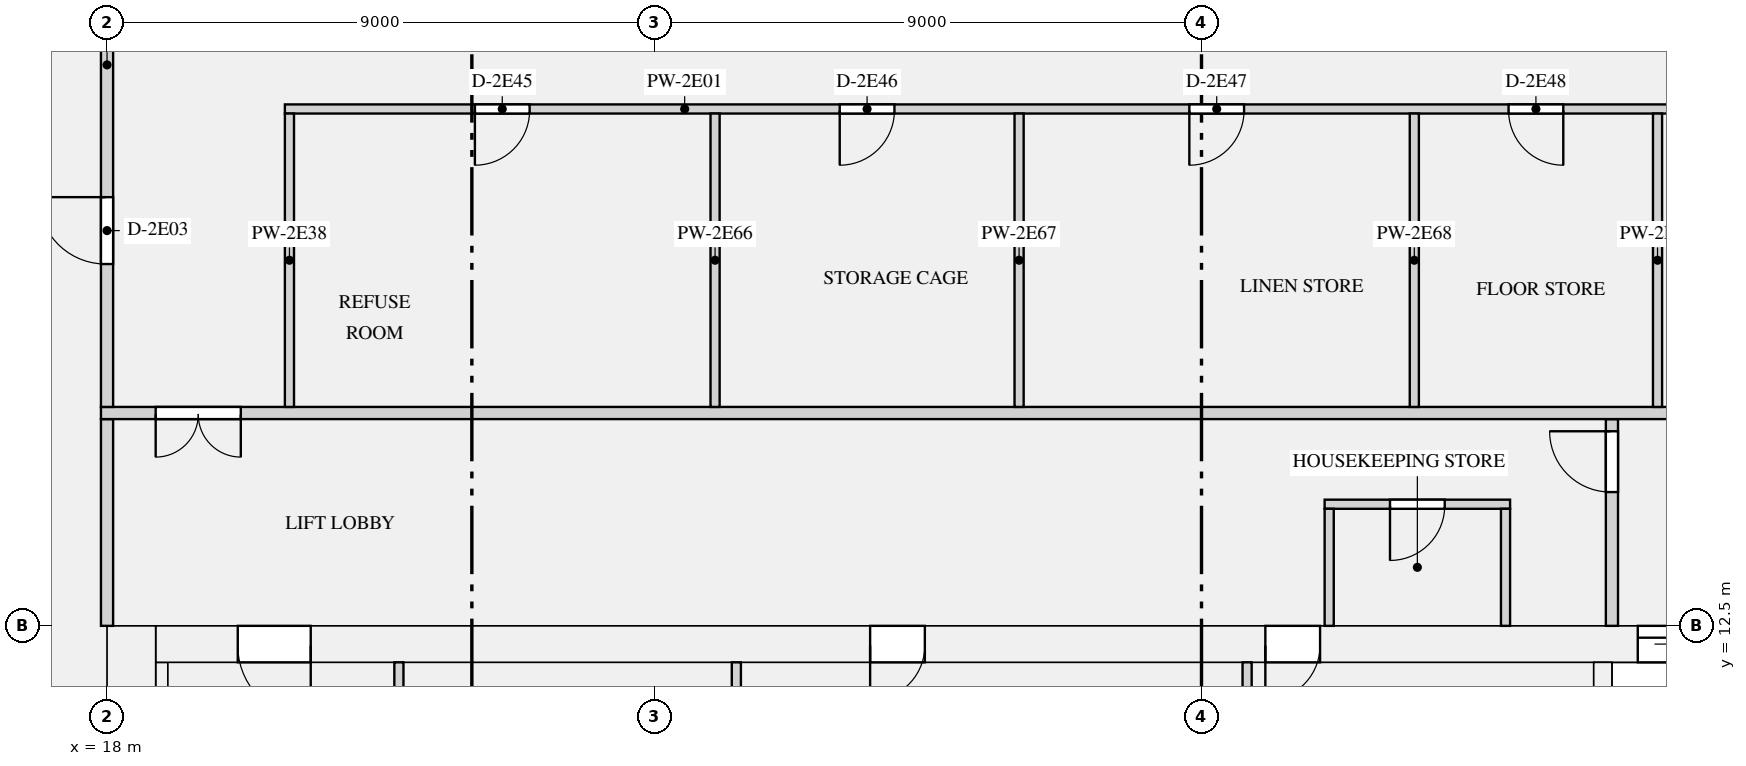
"""IFC4 building model, lengths in metres.
Left out: names, types, materials, properties, quantities, classifications, styles, units other than length and angle.
Written with IfcOpenShell. Run it as: python <this file> out.ifc"""

import sys

from ifc_helpers import new_model, si_unit, direction, frame, frame_2d, origin, place, context, subcontext, project, spatial, rectangle, extrude, element, fill, save


model = new_model("IFC4")
c1 = context("Model", 3, precision=1e-05, world=origin(), true_north=direction((0.0, 1.0)))
c2 = subcontext(c1, "Body", "Model", "MODEL_VIEW")
j1 = project(units=[si_unit("LENGTHUNIT", "METRE"), si_unit("PLANEANGLEUNIT", "RADIAN")], contexts=[c1])
p1 = place(None, origin())
s1 = spatial("IfcSite", under=j1, at=p1, CompositionType="ELEMENT")
p2 = place(p1, origin())
s2 = spatial("IfcBuilding", under=s1, at=p2, CompositionType="ELEMENT")
p3 = place(p2, frame((0.0, 0.0, 118.2)))
s3 = spatial("IfcBuildingStorey", under=s2, at=p3, CompositionType="ELEMENT", Elevation=118.2)
p4 = place(p3, frame((18.4, 0.0, 0.0), z_axis=(0.0, 0.0, 1.0), x_axis=(0.0, 1.0, 0.0)))
e1 = element("IfcWall", 1, at=p4, inside=s3, PredefinedType="SHEAR", context=c2, shape_type="SweptSolid", body=[
    extrude(rectangle(XDim=12.5, YDim=0.8, at=frame_2d((6.25, 0.0))), origin(), (0.0, 0.0, 1.0), 3.15),
])
p5 = place(p3, frame((18.8, 12.2, 0.0), z_axis=(0.0, 0.0, 1.0), x_axis=(1.0, 0.0, 0.0)))
e2 = element("IfcWall", 2, at=p5, inside=s3, PredefinedType="SHEAR", context=c2, shape_type="SweptSolid", body=[
    extrude(rectangle(XDim=34.4, YDim=0.6, at=frame_2d((17.2, 0.0))), origin(), (0.0, 0.0, 1.0), 3.15),
])
p6 = place(p5, frame((24.375, 0.0, 0.0)))
e3 = element("IfcOpeningElement", 3, at=p6, cuts=e2, PredefinedType="OPENING", context=c2, shape_type="SweptSolid", body=[
    extrude(rectangle(XDim=1.1, YDim=2.1, at=frame_2d((0.55, 1.05))), frame((0.0, 0.31, 0.0), z_axis=(0.0, -1.0, 0.0), x_axis=(1.0, 0.0, 0.0)), (0.0, 0.0, 1.0), 0.62),
])
p7 = place(p5, frame((26.625, 0.0, 0.0)))
e4 = element("IfcOpeningElement", 4, at=p7, cuts=e2, PredefinedType="OPENING", context=c2, shape_type="SweptSolid", body=[
    extrude(rectangle(XDim=1.1, YDim=2.1, at=frame_2d((0.55, 1.05))), frame((0.0, 0.31, 0.0), z_axis=(0.0, -1.0, 0.0), x_axis=(1.0, 0.0, 0.0)), (0.0, 0.0, 1.0), 0.62),
])
p8 = place(p5, frame((28.875, 0.0, 0.0)))
e5 = element("IfcOpeningElement", 5, at=p8, cuts=e2, PredefinedType="OPENING", context=c2, shape_type="SweptSolid", body=[
    extrude(rectangle(XDim=1.1, YDim=2.1, at=frame_2d((0.55, 1.05))), frame((0.0, 0.31, 0.0), z_axis=(0.0, -1.0, 0.0), x_axis=(1.0, 0.0, 0.0)), (0.0, 0.0, 1.0), 0.62),
])
p9 = place(p5, frame((11.75, 0.0, 0.0)))
e6 = element("IfcOpeningElement", 6, at=p9, cuts=e2, PredefinedType="OPENING", context=c2, shape_type="SweptSolid", body=[
    extrude(rectangle(XDim=0.9, YDim=2.1, at=frame_2d((0.45, 1.05))), frame((0.0, 0.31, 0.0), z_axis=(0.0, -1.0, 0.0), x_axis=(1.0, 0.0, 0.0)), (0.0, 0.0, 1.0), 0.62),
])
p10 = place(p5, frame((18.25, 0.0, 0.0)))
e7 = element("IfcOpeningElement", 7, at=p10, cuts=e2, PredefinedType="OPENING", context=c2, shape_type="SweptSolid", body=[
    extrude(rectangle(XDim=0.9, YDim=2.1, at=frame_2d((0.45, 1.05))), frame((0.0, 0.31, 0.0), z_axis=(0.0, -1.0, 0.0), x_axis=(1.0, 0.0, 0.0)), (0.0, 0.0, 1.0), 0.62),
])
p11 = place(p5, frame((1.35, 0.0, 0.0)))
e8 = element("IfcOpeningElement", 8, at=p11, cuts=e2, PredefinedType="OPENING", context=c2, shape_type="SweptSolid", body=[
    extrude(rectangle(XDim=1.2, YDim=2.1, at=frame_2d((0.6, 1.05))), frame((0.0, 0.31, 0.0), z_axis=(0.0, -1.0, 0.0), x_axis=(1.0, 0.0, 0.0)), (0.0, 0.0, 1.0), 0.62),
])
p12 = place(p5, frame((31.85, 0.0, 0.0)))
e9 = element("IfcOpeningElement", 9, at=p12, cuts=e2, PredefinedType="OPENING", context=c2, shape_type="SweptSolid", body=[
    extrude(rectangle(XDim=1.2, YDim=2.1, at=frame_2d((0.6, 1.05))), frame((0.0, 0.31, 0.0), z_axis=(0.0, -1.0, 0.0), x_axis=(1.0, 0.0, 0.0)), (0.0, 0.0, 1.0), 0.62),
])
p13 = place(p3, frame((18.9, 1.0, 0.0), z_axis=(0.0, 0.0, 1.0), x_axis=(0.0, 1.0, 0.0)))
e10 = element("IfcWall", 10, at=p13, inside=s3, PredefinedType="SHEAR", context=c2, shape_type="SweptSolid", body=[
    extrude(rectangle(XDim=10.9, YDim=0.2, at=frame_2d((5.45, 0.0))), origin(), (0.0, 0.0, 1.0), 3.15),
])
p14 = place(p3, frame((42.6, 8.25, 0.0), z_axis=(0.0, 0.0, 1.0), x_axis=(0.0, 1.0, 0.0)))
e11 = element("IfcWall", 11, at=p14, inside=s3, PredefinedType="SHEAR", context=c2, shape_type="SweptSolid", body=[
    extrude(rectangle(XDim=3.65, YDim=0.3, at=frame_2d((1.825, 0.0))), origin(), (0.0, 0.0, 1.0), 3.15),
])
p15 = place(p3, frame((38.025, 14.5, 0.0), z_axis=(0.0, 0.0, 1.0), x_axis=(1.0, 0.0, 0.0)))
e12 = element("IfcWall", 12, at=p15, inside=s3, PredefinedType="PARTITIONING", context=c2, shape_type="SweptSolid", body=[
    extrude(rectangle(XDim=3.05, YDim=0.15, at=frame_2d((1.525, 0.0))), origin(), (0.0, 0.0, 1.0), 2.83),
])
p16 = place(p15, frame((1.075, 0.0, 0.0)))
e13 = element("IfcOpeningElement", 13, at=p16, cuts=e12, PredefinedType="OPENING", context=c2, shape_type="SweptSolid", body=[
    extrude(rectangle(XDim=0.9, YDim=2.1, at=frame_2d((0.45, 1.05))), frame((0.0, 0.085, 0.0), z_axis=(0.0, -1.0, 0.0), x_axis=(1.0, 0.0, 0.0)), (0.0, 0.0, 1.0), 0.17),
])
p17 = place(p3, frame((22.8, 6.725, 0.0), z_axis=(0.0, 0.0, 1.0), x_axis=(0.0, 1.0, 0.0)))
e14 = element("IfcWall", 14, at=p17, inside=s3, PredefinedType="PARTITIONING", context=c2, shape_type="SweptSolid", body=[
    extrude(rectangle(XDim=5.175, YDim=0.15, at=frame_2d((2.587, 0.0))), origin(), (0.0, 0.0, 1.0), 2.83),
])
for number, where, z_axis, x_axis in (
    (15, (28.35, 9.265, 0.0), (0.0, 0.0, 1.0), (0.0, 1.0, 0.0)),
    (16, (36.75, 9.265, 0.0), (0.0, 0.0, 1.0), (0.0, 1.0, 0.0)),
):
    element("IfcWall", number, at=place(p3, frame(where, z_axis=z_axis, x_axis=x_axis)), inside=s3, PredefinedType="PARTITIONING", context=c2, shape_type="SweptSolid", body=[
        extrude(rectangle(XDim=2.635, YDim=0.15, at=frame_2d((1.317, 0.0))), origin(), (0.0, 0.0, 1.0), 2.83),
    ])
p18 = place(p3, frame((18.0, 12.5, 0.0), z_axis=(0.0, 0.0, 1.0), x_axis=(0.0, 1.0, 0.0)))
e17 = element("IfcWall", 17, at=p18, inside=s3, PredefinedType="PARTITIONING", context=c2, shape_type="SweptSolid", body=[
    extrude(rectangle(XDim=3.4, YDim=0.2, at=frame_2d((1.7, 0.0))), origin(), (0.0, 0.0, 1.0), 2.83),
])
for number, where, z_axis, x_axis in (
    (18, (38.1, 12.5, 0.0), (0.0, 0.0, 1.0), (0.0, 1.0, 0.0)),
    (19, (41.0, 12.5, 0.0), (0.0, 0.0, 1.0), (0.0, 1.0, 0.0)),
):
    element("IfcWall", number, at=place(p3, frame(where, z_axis=z_axis, x_axis=x_axis)), inside=s3, PredefinedType="PARTITIONING", context=c2, shape_type="SweptSolid", body=[
        extrude(rectangle(XDim=1.925, YDim=0.15, at=frame_2d((0.962, 0.0))), origin(), (0.0, 0.0, 1.0), 2.83),
    ])
p19 = place(p3, frame((42.75, 12.5, 0.0), z_axis=(0.0, 0.0, 1.0), x_axis=(0.0, 1.0, 0.0)))
e20 = element("IfcWall", 20, at=p19, inside=s3, PredefinedType="PARTITIONING", context=c2, shape_type="SweptSolid", body=[
    extrude(rectangle(XDim=3.4, YDim=0.2, at=frame_2d((1.7, 0.0))), origin(), (0.0, 0.0, 1.0), 2.83),
])
p20 = place(p19, frame((2.2, 0.0, 0.0)))
e21 = element("IfcOpeningElement", 21, at=p20, cuts=e20, PredefinedType="OPENING", context=c2, shape_type="SweptSolid", body=[
    extrude(rectangle(XDim=1.0, YDim=2.1, at=frame_2d((0.5, 1.05))), frame((0.0, 0.11, 0.0), z_axis=(0.0, -1.0, 0.0), x_axis=(1.0, 0.0, 0.0)), (0.0, 0.0, 1.0), 0.22),
])
p21 = place(p3, frame((20.925, 21.0, 0.0), z_axis=(0.0, 0.0, 1.0), x_axis=(1.0, 0.0, 0.0)))
e22 = element("IfcWall", 22, at=p21, inside=s3, PredefinedType="PARTITIONING", context=c2, shape_type="SweptSolid", body=[
    extrude(rectangle(XDim=30.15, YDim=0.15, at=frame_2d((15.075, 0.0))), origin(), (0.0, 0.0, 1.0), 2.83),
])
p22 = place(p21, frame((3.125, 0.0, 0.0)))
e23 = element("IfcOpeningElement", 23, at=p22, cuts=e22, PredefinedType="OPENING", context=c2, shape_type="SweptSolid", body=[
    extrude(rectangle(XDim=0.9, YDim=2.1, at=frame_2d((0.45, 1.05))), frame((0.0, 0.085, 0.0), z_axis=(0.0, -1.0, 0.0), x_axis=(1.0, 0.0, 0.0)), (0.0, 0.0, 1.0), 0.17),
])
p23 = place(p21, frame((9.125, 0.0, 0.0)))
e24 = element("IfcOpeningElement", 24, at=p23, cuts=e22, PredefinedType="OPENING", context=c2, shape_type="SweptSolid", body=[
    extrude(rectangle(XDim=0.9, YDim=2.1, at=frame_2d((0.45, 1.05))), frame((0.0, 0.085, 0.0), z_axis=(0.0, -1.0, 0.0), x_axis=(1.0, 0.0, 0.0)), (0.0, 0.0, 1.0), 0.17),
])
p24 = place(p21, frame((14.875, 0.0, 0.0)))
e25 = element("IfcOpeningElement", 25, at=p24, cuts=e22, PredefinedType="OPENING", context=c2, shape_type="SweptSolid", body=[
    extrude(rectangle(XDim=0.9, YDim=2.1, at=frame_2d((0.45, 1.05))), frame((0.0, 0.085, 0.0), z_axis=(0.0, -1.0, 0.0), x_axis=(1.0, 0.0, 0.0)), (0.0, 0.0, 1.0), 0.17),
])
p25 = place(p21, frame((20.125, 0.0, 0.0)))
e26 = element("IfcOpeningElement", 26, at=p25, cuts=e22, PredefinedType="OPENING", context=c2, shape_type="SweptSolid", body=[
    extrude(rectangle(XDim=0.9, YDim=2.1, at=frame_2d((0.45, 1.05))), frame((0.0, 0.085, 0.0), z_axis=(0.0, -1.0, 0.0), x_axis=(1.0, 0.0, 0.0)), (0.0, 0.0, 1.0), 0.17),
])
p26 = place(p21, frame((25.875, 0.0, 0.0)))
e27 = element("IfcOpeningElement", 27, at=p26, cuts=e22, PredefinedType="OPENING", context=c2, shape_type="SweptSolid", body=[
    extrude(rectangle(XDim=0.9, YDim=2.1, at=frame_2d((0.45, 1.05))), frame((0.0, 0.085, 0.0), z_axis=(0.0, -1.0, 0.0), x_axis=(1.0, 0.0, 0.0)), (0.0, 0.0, 1.0), 0.17),
])
p27 = place(p3, frame((17.9, 16.0, 0.0), z_axis=(0.0, 0.0, 1.0), x_axis=(1.0, 0.0, 0.0)))
e28 = element("IfcWall", 28, at=p27, inside=s3, PredefinedType="PARTITIONING", context=c2, shape_type="SweptSolid", body=[
    extrude(rectangle(XDim=36.2, YDim=0.2, at=frame_2d((18.1, 0.0))), origin(), (0.0, 0.0, 1.0), 2.83),
])
p28 = place(p27, frame((0.9, 0.0, 0.0)))
e29 = element("IfcOpeningElement", 29, at=p28, cuts=e28, PredefinedType="OPENING", context=c2, shape_type="SweptSolid", body=[
    extrude(rectangle(XDim=1.4, YDim=2.1, at=frame_2d((0.7, 1.05))), frame((0.0, 0.11, 0.0), z_axis=(0.0, -1.0, 0.0), x_axis=(1.0, 0.0, 0.0)), (0.0, 0.0, 1.0), 0.22),
])
p29 = place(p27, frame((33.9, 0.0, 0.0)))
e30 = element("IfcOpeningElement", 30, at=p29, cuts=e28, PredefinedType="OPENING", context=c2, shape_type="SweptSolid", body=[
    extrude(rectangle(XDim=1.4, YDim=2.1, at=frame_2d((0.7, 1.05))), frame((0.0, 0.11, 0.0), z_axis=(0.0, -1.0, 0.0), x_axis=(1.0, 0.0, 0.0)), (0.0, 0.0, 1.0), 0.22),
])
p30 = place(p3, frame((18.0, 16.1, 0.0), z_axis=(0.0, 0.0, 1.0), x_axis=(0.0, 1.0, 0.0)))
e31 = element("IfcWall", 31, at=p30, inside=s3, PredefinedType="PARTITIONING", context=c2, shape_type="SweptSolid", body=[
    extrude(rectangle(XDim=7.8, YDim=0.2, at=frame_2d((3.9, 0.0))), origin(), (0.0, 0.0, 1.0), 2.83),
])
p31 = place(p30, frame((2.35, 0.0, 0.0)))
e32 = element("IfcOpeningElement", 32, at=p31, cuts=e31, PredefinedType="OPENING", context=c2, shape_type="SweptSolid", body=[
    extrude(rectangle(XDim=1.1, YDim=2.1, at=frame_2d((0.55, 1.05))), frame((0.0, 0.11, 0.0), z_axis=(0.0, -1.0, 0.0), x_axis=(1.0, 0.0, 0.0)), (0.0, 0.0, 1.0), 0.22),
])
for number, where, z_axis, x_axis in (
    (33, (21.0, 16.1, 0.0), (0.0, 0.0, 1.0), (0.0, 1.0, 0.0)),
    (34, (28.0, 16.1, 0.0), (0.0, 0.0, 1.0), (0.0, 1.0, 0.0)),
    (35, (33.0, 16.1, 0.0), (0.0, 0.0, 1.0), (0.0, 1.0, 0.0)),
    (36, (39.5, 16.1, 0.0), (0.0, 0.0, 1.0), (0.0, 1.0, 0.0)),
    (37, (43.5, 16.1, 0.0), (0.0, 0.0, 1.0), (0.0, 1.0, 0.0)),
):
    element("IfcWall", number, at=place(p3, frame(where, z_axis=z_axis, x_axis=x_axis)), inside=s3, PredefinedType="PARTITIONING", context=c2, shape_type="SweptSolid", body=[
        extrude(rectangle(XDim=4.825, YDim=0.15, at=frame_2d((2.413, 0.0))), origin(), (0.0, 0.0, 1.0), 2.83),
    ])
p32 = place(p6, origin())
e38 = element("IfcDoor", 38, at=p32, inside=s3, OperationType="DOUBLE_DOOR_SLIDING", PredefinedType="DOOR", context=c2, shape_type="SweptSolid", body=[
    extrude(rectangle(XDim=1.1, YDim=2.1, at=frame_2d((0.55, 1.05))), frame((0.0, 0.025, 0.0), z_axis=(0.0, -1.0, 0.0), x_axis=(1.0, 0.0, 0.0)), (0.0, 0.0, 1.0), 0.05),
])
fill(e3, e38)
p33 = place(p16, frame((0.9, 0.0, 0.0), z_axis=(0.0, 0.0, 1.0), x_axis=(-1.0, 0.0, 0.0)))
e39 = element("IfcDoor", 39, at=p33, inside=s3, OperationType="SINGLE_SWING_RIGHT", PredefinedType="DOOR", context=c2, shape_type="SweptSolid", body=[
    extrude(rectangle(XDim=0.9, YDim=2.1, at=frame_2d((0.45, 1.05))), frame((0.0, 0.025, 0.0), z_axis=(0.0, -1.0, 0.0), x_axis=(1.0, 0.0, 0.0)), (0.0, 0.0, 1.0), 0.05),
])
fill(e13, e39)
p34 = place(p9, frame((0.9, 0.0, 0.0), z_axis=(0.0, 0.0, 1.0), x_axis=(-1.0, 0.0, 0.0)))
e40 = element("IfcDoor", 40, at=p34, inside=s3, OperationType="SINGLE_SWING_RIGHT", PredefinedType="DOOR", context=c2, shape_type="SweptSolid", body=[
    extrude(rectangle(XDim=0.9, YDim=2.1, at=frame_2d((0.45, 1.05))), frame((0.0, 0.025, 0.0), z_axis=(0.0, -1.0, 0.0), x_axis=(1.0, 0.0, 0.0)), (0.0, 0.0, 1.0), 0.05),
])
fill(e6, e40)
p35 = place(p10, frame((0.9, 0.0, 0.0), z_axis=(0.0, 0.0, 1.0), x_axis=(-1.0, 0.0, 0.0)))
e41 = element("IfcDoor", 41, at=p35, inside=s3, OperationType="SINGLE_SWING_RIGHT", PredefinedType="DOOR", context=c2, shape_type="SweptSolid", body=[
    extrude(rectangle(XDim=0.9, YDim=2.1, at=frame_2d((0.45, 1.05))), frame((0.0, 0.025, 0.0), z_axis=(0.0, -1.0, 0.0), x_axis=(1.0, 0.0, 0.0)), (0.0, 0.0, 1.0), 0.05),
])
fill(e7, e41)
p36 = place(p11, frame((1.2, 0.0, 0.0), z_axis=(0.0, 0.0, 1.0), x_axis=(-1.0, 0.0, 0.0)))
e42 = element("IfcDoor", 42, at=p36, inside=s3, OperationType="SINGLE_SWING_LEFT", PredefinedType="DOOR", context=c2, shape_type="SweptSolid", body=[
    extrude(rectangle(XDim=1.2, YDim=2.1, at=frame_2d((0.6, 1.05))), frame((0.0, 0.025, 0.0), z_axis=(0.0, -1.0, 0.0), x_axis=(1.0, 0.0, 0.0)), (0.0, 0.0, 1.0), 0.05),
])
fill(e8, e42)
p37 = place(p20, origin())
e43 = element("IfcDoor", 43, at=p37, inside=s3, OperationType="SINGLE_SWING_RIGHT", PredefinedType="DOOR", context=c2, shape_type="SweptSolid", body=[
    extrude(rectangle(XDim=1.0, YDim=2.1, at=frame_2d((0.5, 1.05))), frame((0.0, 0.025, 0.0), z_axis=(0.0, -1.0, 0.0), x_axis=(1.0, 0.0, 0.0)), (0.0, 0.0, 1.0), 0.05),
])
fill(e21, e43)
p38 = place(p28, frame((1.4, 0.0, 0.0), z_axis=(0.0, 0.0, 1.0), x_axis=(-1.0, 0.0, 0.0)))
e44 = element("IfcDoor", 44, at=p38, inside=s3, OperationType="DOUBLE_DOOR_SINGLE_SWING", PredefinedType="DOOR", context=c2, shape_type="SweptSolid", body=[
    extrude(rectangle(XDim=1.4, YDim=2.1, at=frame_2d((0.7, 1.05))), frame((0.0, 0.025, 0.0), z_axis=(0.0, -1.0, 0.0), x_axis=(1.0, 0.0, 0.0)), (0.0, 0.0, 1.0), 0.05),
])
fill(e29, e44)
p39 = place(p31, origin())
e45 = element("IfcDoor", 45, at=p39, inside=s3, OperationType="SINGLE_SWING_RIGHT", PredefinedType="DOOR", context=c2, shape_type="SweptSolid", body=[
    extrude(rectangle(XDim=1.1, YDim=2.1, at=frame_2d((0.55, 1.05))), frame((0.0, 0.025, 0.0), z_axis=(0.0, -1.0, 0.0), x_axis=(1.0, 0.0, 0.0)), (0.0, 0.0, 1.0), 0.05),
])
fill(e32, e45)
p40 = place(p22, frame((0.9, 0.0, 0.0), z_axis=(0.0, 0.0, 1.0), x_axis=(-1.0, 0.0, 0.0)))
e46 = element("IfcDoor", 46, at=p40, inside=s3, OperationType="SINGLE_SWING_RIGHT", PredefinedType="DOOR", context=c2, shape_type="SweptSolid", body=[
    extrude(rectangle(XDim=0.9, YDim=2.1, at=frame_2d((0.45, 1.05))), frame((0.0, 0.025, 0.0), z_axis=(0.0, -1.0, 0.0), x_axis=(1.0, 0.0, 0.0)), (0.0, 0.0, 1.0), 0.05),
])
fill(e23, e46)
p41 = place(p23, frame((0.9, 0.0, 0.0), z_axis=(0.0, 0.0, 1.0), x_axis=(-1.0, 0.0, 0.0)))
e47 = element("IfcDoor", 47, at=p41, inside=s3, OperationType="SINGLE_SWING_RIGHT", PredefinedType="DOOR", context=c2, shape_type="SweptSolid", body=[
    extrude(rectangle(XDim=0.9, YDim=2.1, at=frame_2d((0.45, 1.05))), frame((0.0, 0.025, 0.0), z_axis=(0.0, -1.0, 0.0), x_axis=(1.0, 0.0, 0.0)), (0.0, 0.0, 1.0), 0.05),
])
fill(e24, e47)
p42 = place(p24, frame((0.9, 0.0, 0.0), z_axis=(0.0, 0.0, 1.0), x_axis=(-1.0, 0.0, 0.0)))
e48 = element("IfcDoor", 48, at=p42, inside=s3, OperationType="SINGLE_SWING_RIGHT", PredefinedType="DOOR", context=c2, shape_type="SweptSolid", body=[
    extrude(rectangle(XDim=0.9, YDim=2.1, at=frame_2d((0.45, 1.05))), frame((0.0, 0.025, 0.0), z_axis=(0.0, -1.0, 0.0), x_axis=(1.0, 0.0, 0.0)), (0.0, 0.0, 1.0), 0.05),
])
fill(e25, e48)
p43 = place(p25, frame((0.9, 0.0, 0.0), z_axis=(0.0, 0.0, 1.0), x_axis=(-1.0, 0.0, 0.0)))
e49 = element("IfcDoor", 49, at=p43, inside=s3, OperationType="SINGLE_SWING_LEFT", PredefinedType="DOOR", context=c2, shape_type="SweptSolid", body=[
    extrude(rectangle(XDim=0.9, YDim=2.1, at=frame_2d((0.45, 1.05))), frame((0.0, 0.025, 0.0), z_axis=(0.0, -1.0, 0.0), x_axis=(1.0, 0.0, 0.0)), (0.0, 0.0, 1.0), 0.05),
])
fill(e26, e49)
save(model, sys.argv[1])
